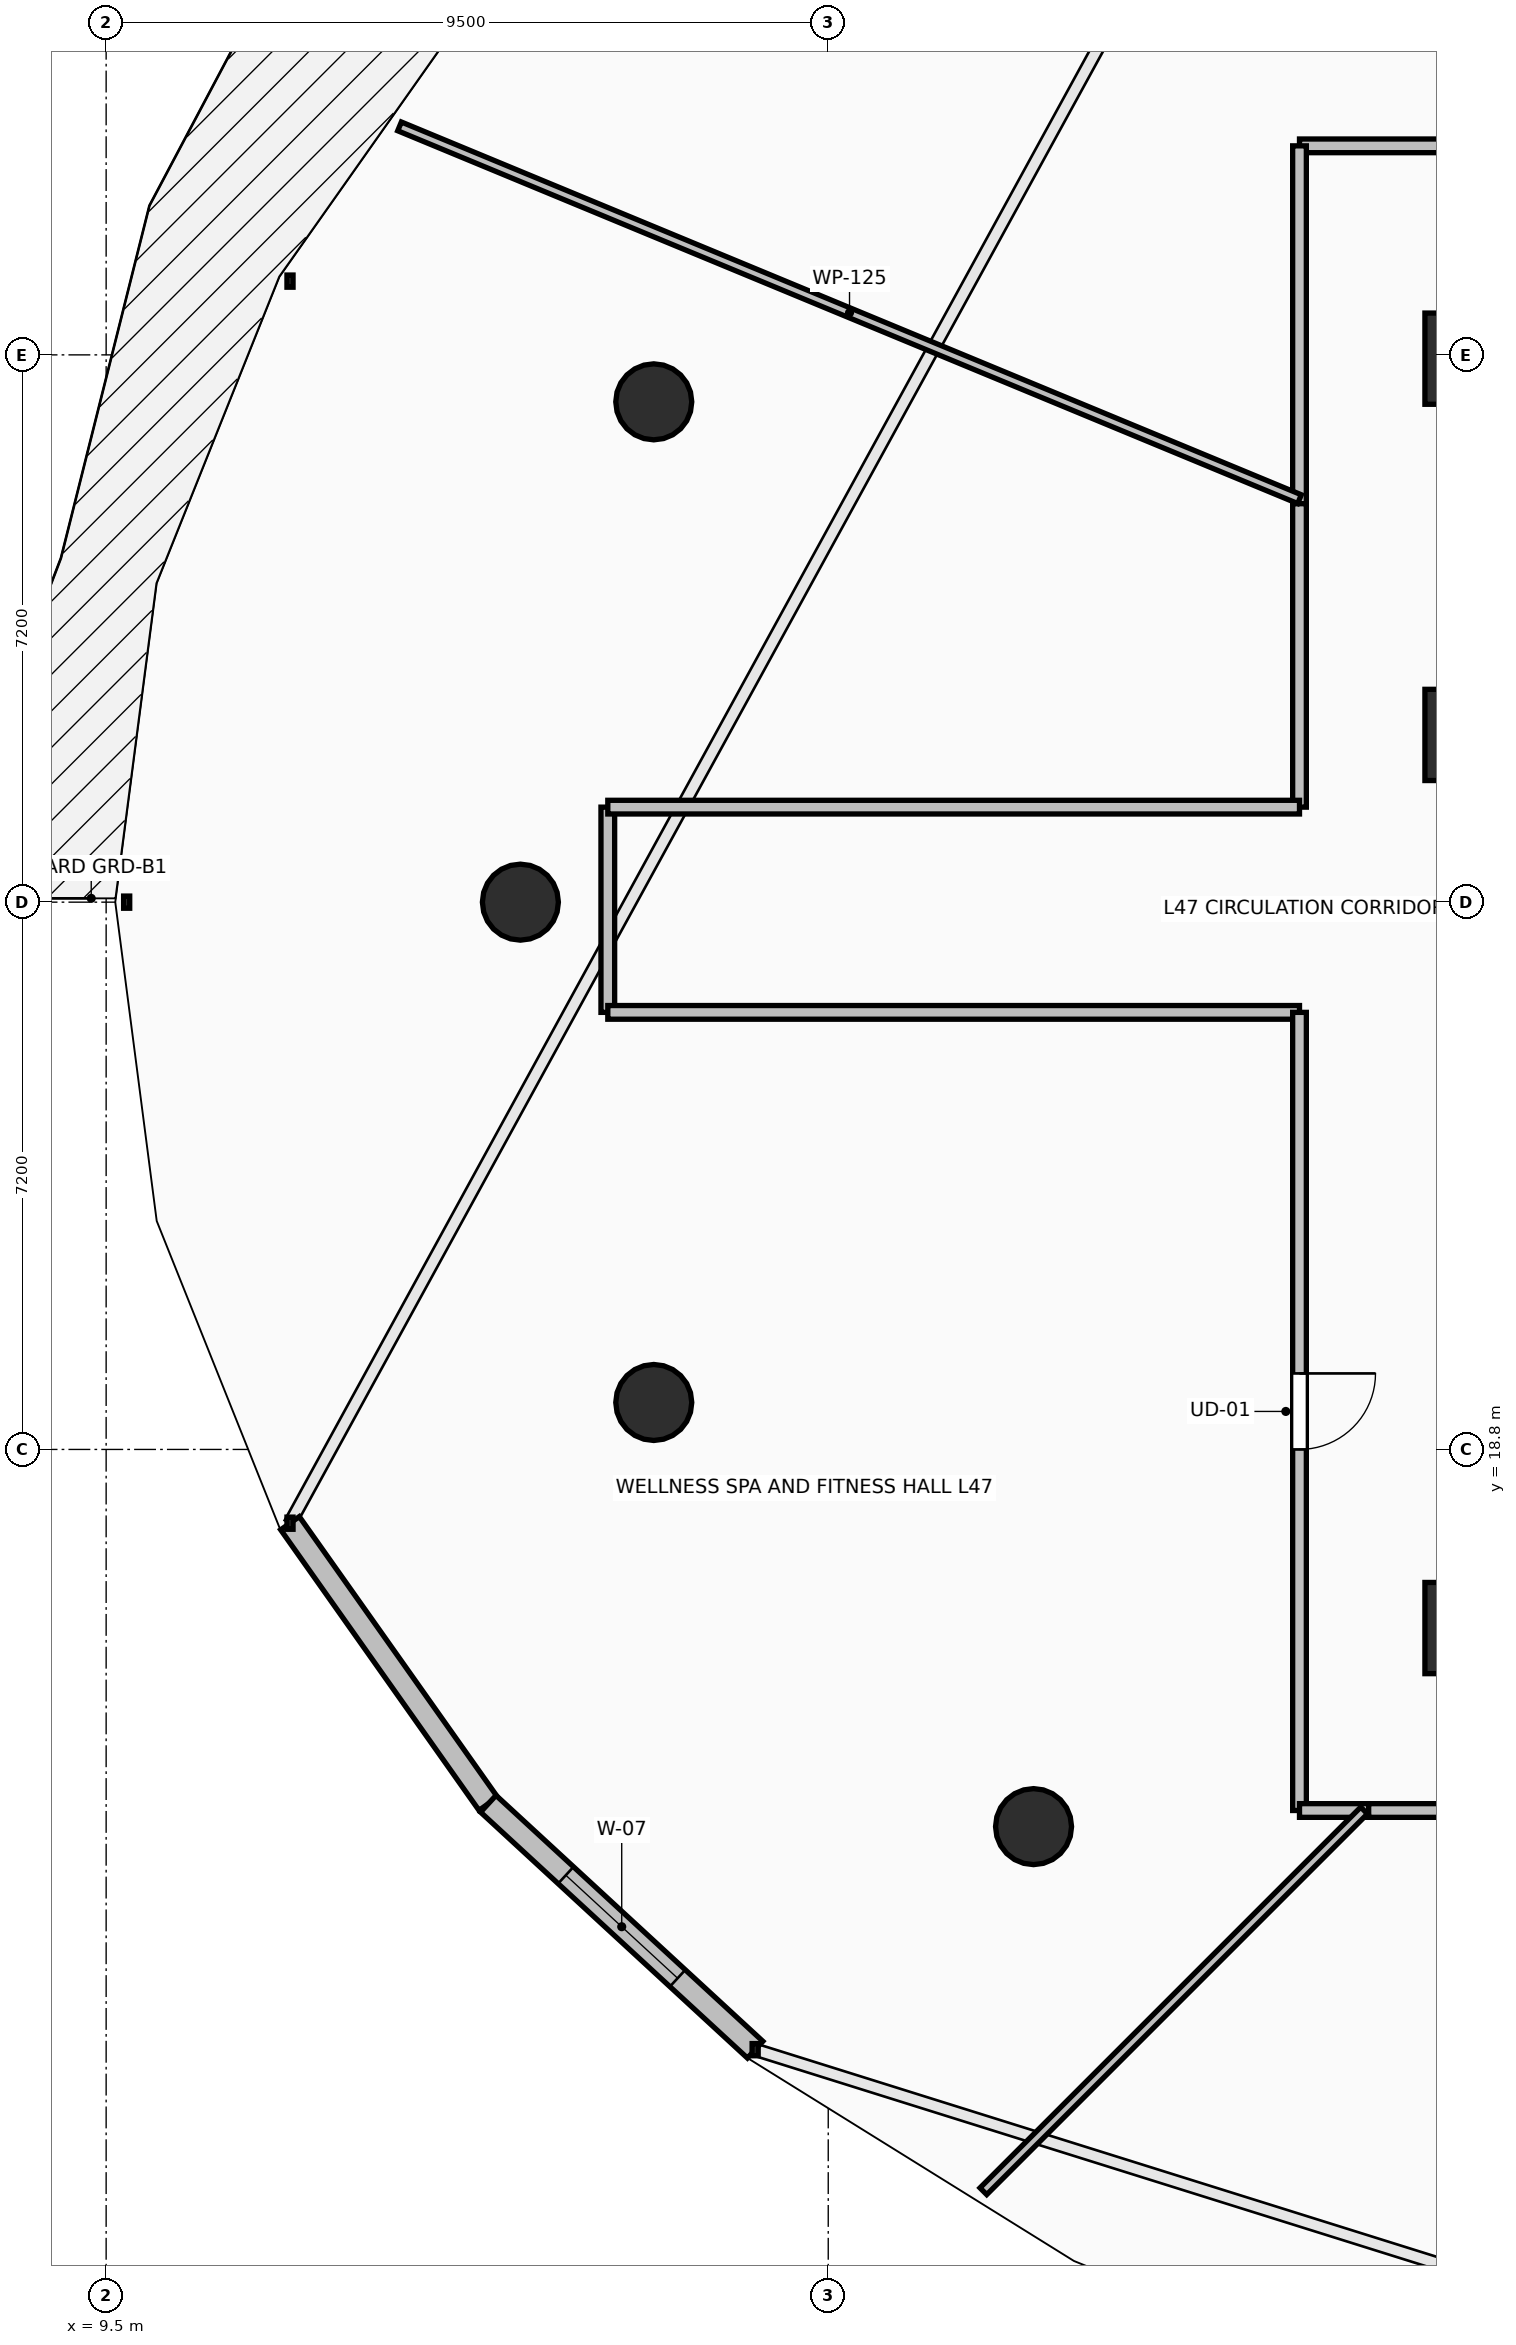
"""IFC4 building model, lengths in metres.
Left out: names, types, materials, properties, quantities, classifications, styles, units other than length and angle.
Written with IfcOpenShell. Run it as: python <this file> out.ifc"""

import sys

from ifc_helpers import new_model, si_unit, direction, frame, frame_2d, origin, origin_2d, place, context, subcontext, project, spatial, rectangle, circle, extrude, element, fill, save


model = new_model("IFC4")
c1 = context("Model", 3, precision=1e-05, world=origin(), true_north=direction((0.0, 1.0)))
c2 = subcontext(c1, "Body", "Model", "MODEL_VIEW")
j1 = project(units=[si_unit("LENGTHUNIT", "METRE"), si_unit("PLANEANGLEUNIT", "RADIAN")], contexts=[c1])
p1 = place(None, origin())
s1 = spatial("IfcSite", under=j1, at=p1, CompositionType="ELEMENT")
p2 = place(p1, origin())
s2 = spatial("IfcBuilding", under=s1, at=p2, CompositionType="ELEMENT")
p3 = place(p2, frame((0.0, 0.0, 174.6)))
s3 = spatial("IfcBuildingStorey", under=s2, at=p3, CompositionType="ELEMENT", Elevation=174.6)
for number, where, z_axis, x_axis in (
    (1, (16.705, 32.582, 0.0), (0.0, 0.0, 1.0), (-0.924, 0.383, 0.0)),
    (2, (14.95, 26.0, 0.0), (0.0, 0.0, 1.0), (-1.0, 0.0, 0.0)),
    (3, (16.705, 19.418, 0.0), (0.0, 0.0, 1.0), (-0.924, -0.383, 0.0)),
    (4, (21.701, 13.838, 0.0), (0.0, 0.0, 1.0), (-0.707, -0.707, 0.0)),
):
    element("IfcColumn", number, at=place(p3, frame(where, z_axis=z_axis, x_axis=x_axis)), inside=s3, PredefinedType="COLUMN", context=c2, shape_type="SweptSolid", body=[
        extrude(circle(Radius=0.5, at=origin_2d()), origin(), (0.0, 0.0, 1.0), 4.5),
    ])
for number, where, z_axis, x_axis in (
    (5, (27.25, 16.45, 0.0), (0.0, 0.0, 1.0), (1.0, 0.0, 0.0)),
    (6, (27.25, 28.2, 0.0), (0.0, 0.0, 1.0), (1.0, 0.0, 0.0)),
    (7, (27.25, 33.15, 0.0), (0.0, 0.0, 1.0), (1.0, 0.0, 0.0)),
):
    element("IfcColumn", number, at=place(p3, frame(where, z_axis=z_axis, x_axis=x_axis)), inside=s3, PredefinedType="PILASTER", context=c2, shape_type="SweptSolid", body=[
        extrude(rectangle(XDim=0.8, YDim=1.2, at=origin_2d()), origin(), (0.0, 0.0, 1.0), 4.5),
    ])
p4 = place(p3, frame((11.919, 17.83, 0.0), z_axis=(0.0, 0.0, 1.0), x_axis=(0.577168747264, -0.81662490605, 0.0)))
e8 = element("IfcWall", 8, at=p4, inside=s3, PredefinedType="STANDARD", context=c2, shape_type="SweptSolid", body=[
    extrude(rectangle(XDim=4.52, YDim=0.3, at=frame_2d((2.26, 0.0))), origin(), (0.0, 0.0, 1.0), 4.24),
])
p5 = place(p3, frame((14.528, 14.139, 0.0), z_axis=(0.0, 0.0, 1.0), x_axis=(0.735359993374, -0.677676678177, 0.0)))
e9 = element("IfcWall", 9, at=p5, inside=s3, PredefinedType="STANDARD", context=c2, shape_type="SweptSolid", body=[
    extrude(rectangle(XDim=4.774, YDim=0.3, at=frame_2d((2.387, 0.0))), origin(), (0.0, 0.0, 1.0), 4.24),
])
p6 = place(p5, frame((1.387, 0.0, 0.85)))
e10 = element("IfcOpeningElement", 10, at=p6, cuts=e9, PredefinedType="OPENING", context=c2, shape_type="SweptSolid", body=[
    extrude(rectangle(XDim=2.0, YDim=2.45, at=frame_2d((1.0, 1.225))), frame((0.0, 0.165, 0.0), z_axis=(0.0, -1.0, 0.0), x_axis=(1.0, 0.0, 0.0)), (0.0, 0.0, 1.0), 0.33),
])
p7 = place(p3, frame((37.94, 35.95, 0.0), z_axis=(0.0, 0.0, 1.0), x_axis=(-1.0, 0.0, 0.0)))
e11 = element("IfcWall", 11, at=p7, inside=s3, PredefinedType="PARTITIONING", context=c2, shape_type="SweptSolid", body=[
    extrude(rectangle(XDim=12.74, YDim=0.18, at=frame_2d((6.37, 0.0))), origin(), (0.0, 0.0, 1.0), 3.432),
])
p8 = place(p7, frame((5.87, 0.0, 0.0)))
e12 = element("IfcOpeningElement", 12, at=p8, cuts=e11, PredefinedType="OPENING", context=c2, shape_type="SweptSolid", body=[
    extrude(rectangle(XDim=1.0, YDim=2.15, at=frame_2d((0.5, 1.075))), frame((0.0, 0.105, 0.0), z_axis=(0.0, -1.0, 0.0), x_axis=(1.0, 0.0, 0.0)), (0.0, 0.0, 1.0), 0.21),
])
p9 = place(p3, frame((25.2, 35.95, 0.0), z_axis=(0.0, 0.0, 1.0), x_axis=(0.0, -1.0, 0.0)))
e13 = element("IfcWall", 13, at=p9, inside=s3, PredefinedType="PARTITIONING", context=c2, shape_type="SweptSolid", body=[
    extrude(rectangle(XDim=4.708, YDim=0.18, at=frame_2d((2.354, 0.0))), origin(), (0.0, 0.0, 1.0), 3.432),
])
p10 = place(p3, frame((16.1, 27.25, 0.0), z_axis=(0.0, 0.0, 1.0), x_axis=(0.0, -1.0, 0.0)))
e14 = element("IfcWall", 14, at=p10, inside=s3, PredefinedType="PARTITIONING", context=c2, shape_type="SweptSolid", body=[
    extrude(rectangle(XDim=2.7, YDim=0.18, at=frame_2d((1.35, 0.0))), origin(), (0.0, 0.0, 1.0), 3.432),
])
p11 = place(p3, frame((16.1, 24.55, 0.0), z_axis=(0.0, 0.0, 1.0), x_axis=(1.0, 0.0, 0.0)))
e15 = element("IfcWall", 15, at=p11, inside=s3, PredefinedType="PARTITIONING", context=c2, shape_type="SweptSolid", body=[
    extrude(rectangle(XDim=9.1, YDim=0.18, at=frame_2d((4.55, 0.0))), origin(), (0.0, 0.0, 1.0), 3.886),
])
p12 = place(p3, frame((25.2, 24.55, 0.0), z_axis=(0.0, 0.0, 1.0), x_axis=(0.0, -1.0, 0.0)))
e16 = element("IfcWall", 16, at=p12, inside=s3, PredefinedType="PARTITIONING", context=c2, shape_type="SweptSolid", body=[
    extrude(rectangle(XDim=10.5, YDim=0.18, at=frame_2d((5.25, 0.0))), origin(), (0.0, 0.0, 1.0), 3.432),
])
p13 = place(p12, frame((4.75, 0.0, 0.0)))
e17 = element("IfcOpeningElement", 17, at=p13, cuts=e16, PredefinedType="OPENING", context=c2, shape_type="SweptSolid", body=[
    extrude(rectangle(XDim=1.0, YDim=2.15, at=frame_2d((0.5, 1.075))), frame((0.0, 0.105, 0.0), z_axis=(0.0, -1.0, 0.0), x_axis=(1.0, 0.0, 0.0)), (0.0, 0.0, 1.0), 0.21),
])
p14 = place(p3, frame((25.2, 14.05, 0.0), z_axis=(0.0, 0.0, 1.0), x_axis=(1.0, 0.0, 0.0)))
e18 = element("IfcWall", 18, at=p14, inside=s3, PredefinedType="PARTITIONING", context=c2, shape_type="SweptSolid", body=[
    extrude(rectangle(XDim=0.91, YDim=0.18, at=frame_2d((0.455, 0.0))), origin(), (0.0, 0.0, 1.0), 3.886),
])
p15 = place(p3, frame((25.2, 31.242, 0.0), z_axis=(0.0, 0.0, 1.0), x_axis=(0.0, -1.0, 0.0)))
e19 = element("IfcWall", 19, at=p15, inside=s3, PredefinedType="PARTITIONING", context=c2, shape_type="SweptSolid", body=[
    extrude(rectangle(XDim=3.992, YDim=0.18, at=frame_2d((1.996, 0.0))), origin(), (0.0, 0.0, 1.0), 3.432),
])
p16 = place(p3, frame((25.2, 27.25, 0.0), z_axis=(0.0, 0.0, 1.0), x_axis=(-1.0, 0.0, 0.0)))
e20 = element("IfcWall", 20, at=p16, inside=s3, PredefinedType="PARTITIONING", context=c2, shape_type="SweptSolid", body=[
    extrude(rectangle(XDim=9.1, YDim=0.18, at=frame_2d((4.55, 0.0))), origin(), (0.0, 0.0, 1.0), 3.432),
])
p17 = place(p3, frame((26.11, 14.05, 0.0), z_axis=(0.0, 0.0, 1.0), x_axis=(1.0, 0.0, 0.0)))
e21 = element("IfcWall", 21, at=p17, inside=s3, PredefinedType="PARTITIONING", context=c2, shape_type="SweptSolid", body=[
    extrude(rectangle(XDim=16.905, YDim=0.18, at=frame_2d((8.452, 0.0))), origin(), (0.0, 0.0, 1.0), 3.432),
])
p18 = place(p17, frame((7.952, 0.0, 0.0)))
e22 = element("IfcOpeningElement", 22, at=p18, cuts=e21, PredefinedType="OPENING", context=c2, shape_type="SweptSolid", body=[
    extrude(rectangle(XDim=1.0, YDim=2.15, at=frame_2d((0.5, 1.075))), frame((0.0, 0.105, 0.0), z_axis=(0.0, -1.0, 0.0), x_axis=(1.0, 0.0, 0.0)), (0.0, 0.0, 1.0), 0.21),
])
p19 = place(p3, frame((13.36, 36.206, 0.0), z_axis=(0.0, 0.0, 1.0), x_axis=(0.923884253459, -0.382672034791, 0.0)))
e23 = element("IfcWall", 23, at=p19, inside=s3, PredefinedType="PARTITIONING", context=c2, shape_type="SweptSolid", body=[
    extrude(rectangle(XDim=12.815, YDim=0.125, at=frame_2d((6.408, 0.0))), origin(), (0.0, 0.0, 1.0), 3.728),
])
p20 = place(p3, frame((21.041, 9.041, 0.0), z_axis=(0.0, 0.0, 1.0), x_axis=(0.707106781187, 0.707106781187, 0.0)))
e24 = element("IfcWall", 24, at=p20, inside=s3, PredefinedType="PARTITIONING", context=c2, shape_type="SweptSolid", body=[
    extrude(rectangle(XDim=7.084, YDim=0.125, at=frame_2d((3.542, 0.0))), origin(), (0.0, 0.0, 1.0), 3.728),
])
p21 = place(p6, origin())
e25 = element("IfcWindow", 25, at=p21, inside=s3, PartitioningType="SINGLE_PANEL", PredefinedType="WINDOW", context=c2, shape_type="SweptSolid", body=[
    extrude(rectangle(XDim=2.0, YDim=2.45, at=frame_2d((1.0, 1.225))), frame((0.0, 0.03, 0.0), z_axis=(0.0, -1.0, 0.0), x_axis=(1.0, 0.0, 0.0)), (0.0, 0.0, 1.0), 0.06),
])
fill(e10, e25)
p22 = place(p13, origin())
e26 = element("IfcDoor", 26, at=p22, inside=s3, OperationType="SINGLE_SWING_LEFT", PredefinedType="DOOR", context=c2, shape_type="SweptSolid", body=[
    extrude(rectangle(XDim=1.0, YDim=2.15, at=frame_2d((0.5, 1.075))), frame((0.0, 0.025, 0.0), z_axis=(0.0, -1.0, 0.0), x_axis=(1.0, 0.0, 0.0)), (0.0, 0.0, 1.0), 0.05),
])
fill(e17, e26)
save(model, sys.argv[1])
